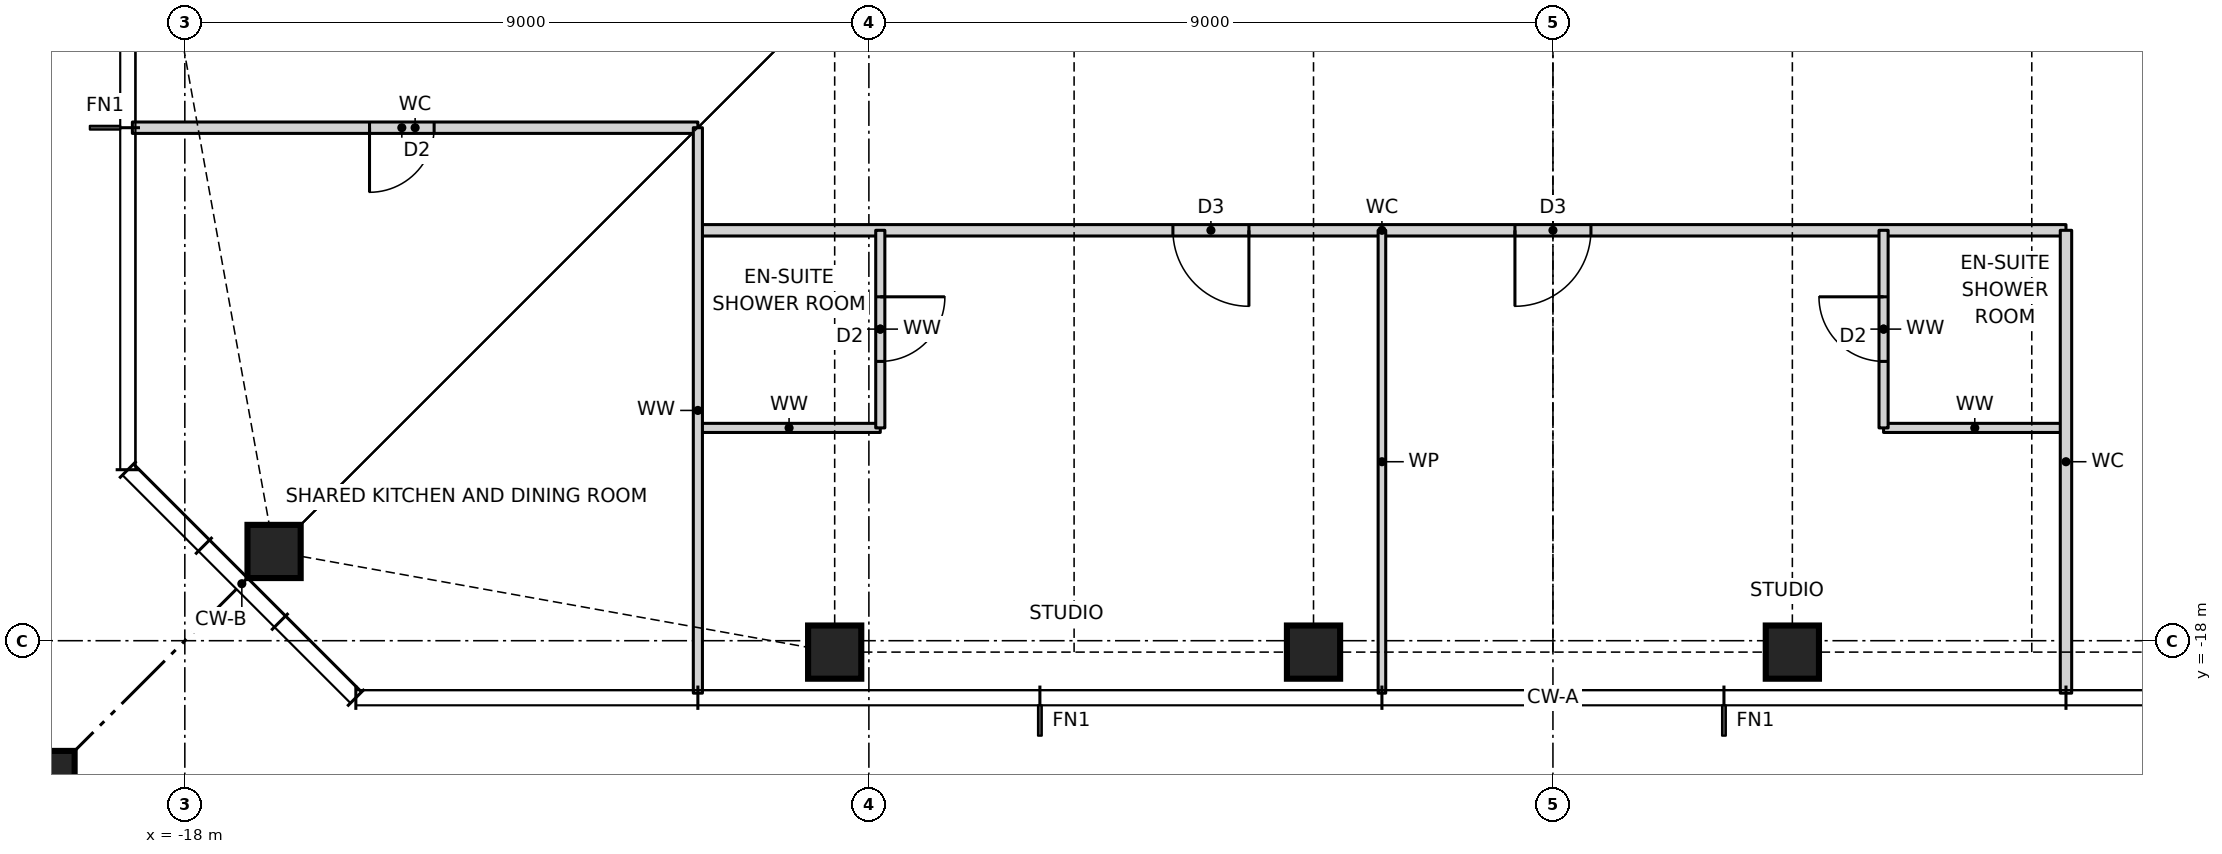
"""IFC4 building model, lengths in metres.
Left out: names, types, materials, properties, quantities, classifications, styles, units other than length and angle.
Written with IfcOpenShell. Run it as: python <this file> out.ifc"""

import sys

from ifc_helpers import new_model, si_unit, direction, frame, frame_2d, origin, origin_2d, place, context, subcontext, project, spatial, rectangle, hollow_rectangle, i_section, extrude, element, fill, save


model = new_model("IFC4")
c1 = context("Model", 3, precision=1e-05, world=origin(), true_north=direction((0.0, 1.0)))
c2 = subcontext(c1, "Body", "Model", "MODEL_VIEW")
j1 = project(units=[si_unit("LENGTHUNIT", "METRE"), si_unit("PLANEANGLEUNIT", "RADIAN")], contexts=[c1])
p1 = place(None, origin())
s1 = spatial("IfcSite", under=j1, at=p1, CompositionType="ELEMENT")
p2 = place(p1, origin())
s2 = spatial("IfcBuilding", under=s1, at=p2, CompositionType="ELEMENT")
p3 = place(p2, frame((0.0, 0.0, 195.0)))
s3 = spatial("IfcBuildingStorey", under=s2, at=p3, CompositionType="ELEMENT", Elevation=195.0)
for number, where, z_axis, x_axis in (
    (1, (-16.826, -16.826, 0.0), (0.0, 0.0, 1.0), (1.0, 0.0, 0.0)),
    (2, (-9.45, -18.15, 0.0), (0.0, 0.0, 1.0), (1.0, 0.0, 0.0)),
    (3, (-3.15, -18.15, 0.0), (0.0, 0.0, 1.0), (1.0, 0.0, 0.0)),
    (4, (3.15, -18.15, 0.0), (0.0, 0.0, 1.0), (1.0, 0.0, 0.0)),
):
    element("IfcColumn", number, at=place(p3, frame(where, z_axis=z_axis, x_axis=x_axis)), inside=s3, PredefinedType="COLUMN", context=c2, shape_type="SweptSolid", body=[
        extrude(hollow_rectangle(XDim=0.7, YDim=0.7, WallThickness=0.06, at=origin_2d()), origin(), (0.0, 0.0, 1.0), 3.5),
    ])
p4 = place(p3, frame((-21.65, -21.65, 0.0), z_axis=(0.0, 0.0, 1.0), x_axis=(1.0, 0.0, 0.0)))
e5 = element("IfcColumn", 5, at=p4, inside=s3, PredefinedType="COLUMN", context=c2, shape_type="SweptSolid", body=[
    extrude(rectangle(XDim=4.4, YDim=4.4, at=origin_2d()), origin(), (0.0, 0.0, 1.0), 3.5),
    extrude(i_section(OverallWidth=0.478, OverallDepth=0.599, WebThickness=0.1, FlangeThickness=0.14, at=origin_2d()), origin(), (0.0, 0.0, 1.0), 3.5),
])
for number, where, z_axis, x_axis in (
    (6, (-11.25, -15.2, 0.0), (0.0, 0.0, 1.0), (1.0, 0.0, 0.0)),
    (7, (4.35, -15.2, 0.0), (0.0, 0.0, 1.0), (1.0, 0.0, 0.0)),
):
    element("IfcWall", number, at=place(p3, frame(where, z_axis=z_axis, x_axis=x_axis)), inside=s3, PredefinedType="PARTITIONING", context=c2, shape_type="SweptSolid", body=[
        extrude(rectangle(XDim=2.4, YDim=0.12, at=frame_2d((1.2, 0.0))), origin(), (0.0, 0.0, 1.0), 3.27),
    ])
p5 = place(p3, frame((-11.25, -12.6, 0.0), z_axis=(0.0, 0.0, 1.0), x_axis=(1.0, 0.0, 0.0)))
e8 = element("IfcWall", 8, at=p5, inside=s3, PredefinedType="PARTITIONING", context=c2, shape_type="SweptSolid", body=[
    extrude(rectangle(XDim=18.0, YDim=0.15, at=frame_2d((9.0, 0.0))), origin(), (0.0, 0.0, 1.0), 3.27),
])
p6 = place(p5, frame((6.25, 0.0, 0.0)))
e9 = element("IfcOpeningElement", 9, at=p6, cuts=e8, PredefinedType="OPENING", context=c2, shape_type="SweptSolid", body=[
    extrude(rectangle(XDim=1.0, YDim=2.1, at=frame_2d((0.5, 1.05))), frame((0.0, 0.085, 0.0), z_axis=(0.0, -1.0, 0.0), x_axis=(1.0, 0.0, 0.0)), (0.0, 0.0, 1.0), 0.17),
])
p7 = place(p5, frame((10.75, 0.0, 0.0)))
e10 = element("IfcOpeningElement", 10, at=p7, cuts=e8, PredefinedType="OPENING", context=c2, shape_type="SweptSolid", body=[
    extrude(rectangle(XDim=1.0, YDim=2.1, at=frame_2d((0.5, 1.05))), frame((0.0, 0.085, 0.0), z_axis=(0.0, -1.0, 0.0), x_axis=(1.0, 0.0, 0.0)), (0.0, 0.0, 1.0), 0.17),
])
p8 = place(p3, frame((-18.69, -11.25, 0.0), z_axis=(0.0, 0.0, 1.0), x_axis=(1.0, 0.0, 0.0)))
e11 = element("IfcWall", 11, at=p8, inside=s3, PredefinedType="PARTITIONING", context=c2, shape_type="SweptSolid", body=[
    extrude(rectangle(XDim=7.44, YDim=0.15, at=frame_2d((3.72, 0.0))), origin(), (0.0, 0.0, 1.0), 3.27),
])
p9 = place(p8, frame((3.12, 0.0, 0.0)))
e12 = element("IfcOpeningElement", 12, at=p9, cuts=e11, PredefinedType="OPENING", context=c2, shape_type="SweptSolid", body=[
    extrude(rectangle(XDim=0.85, YDim=2.1, at=frame_2d((0.425, 1.05))), frame((0.0, 0.085, 0.0), z_axis=(0.0, -1.0, 0.0), x_axis=(1.0, 0.0, 0.0)), (0.0, 0.0, 1.0), 0.17),
])
p10 = place(p3, frame((6.75, -18.69, 0.0), z_axis=(0.0, 0.0, 1.0), x_axis=(0.0, 1.0, 0.0)))
e13 = element("IfcWall", 13, at=p10, inside=s3, PredefinedType="PARTITIONING", context=c2, shape_type="SweptSolid", body=[
    extrude(rectangle(XDim=6.09, YDim=0.15, at=frame_2d((3.045, 0.0))), origin(), (0.0, 0.0, 1.0), 3.27),
])
p11 = place(p3, frame((4.35, -15.2, 0.0), z_axis=(0.0, 0.0, 1.0), x_axis=(0.0, 1.0, 0.0)))
e14 = element("IfcWall", 14, at=p11, inside=s3, PredefinedType="PARTITIONING", context=c2, shape_type="SweptSolid", body=[
    extrude(rectangle(XDim=2.6, YDim=0.12, at=frame_2d((1.3, 0.0))), origin(), (0.0, 0.0, 1.0), 3.27),
])
p12 = place(p11, frame((0.875, 0.0, 0.0)))
e15 = element("IfcOpeningElement", 15, at=p12, cuts=e14, PredefinedType="OPENING", context=c2, shape_type="SweptSolid", body=[
    extrude(rectangle(XDim=0.85, YDim=2.1, at=frame_2d((0.425, 1.05))), frame((0.0, 0.07, 0.0), z_axis=(0.0, -1.0, 0.0), x_axis=(1.0, 0.0, 0.0)), (0.0, 0.0, 1.0), 0.14),
])
p13 = place(p3, frame((-2.25, -18.69, 0.0), z_axis=(0.0, 0.0, 1.0), x_axis=(0.0, 1.0, 0.0)))
e16 = element("IfcWall", 16, at=p13, inside=s3, PredefinedType="PARTITIONING", context=c2, shape_type="SweptSolid", body=[
    extrude(rectangle(XDim=6.09, YDim=0.1, at=frame_2d((3.045, 0.0))), origin(), (0.0, 0.0, 1.0), 3.27),
])
p14 = place(p3, frame((-8.85, -15.2, 0.0), z_axis=(0.0, 0.0, 1.0), x_axis=(0.0, 1.0, 0.0)))
e17 = element("IfcWall", 17, at=p14, inside=s3, PredefinedType="PARTITIONING", context=c2, shape_type="SweptSolid", body=[
    extrude(rectangle(XDim=2.6, YDim=0.12, at=frame_2d((1.3, 0.0))), origin(), (0.0, 0.0, 1.0), 3.27),
])
p15 = place(p14, frame((0.875, 0.0, 0.0)))
e18 = element("IfcOpeningElement", 18, at=p15, cuts=e17, PredefinedType="OPENING", context=c2, shape_type="SweptSolid", body=[
    extrude(rectangle(XDim=0.85, YDim=2.1, at=frame_2d((0.425, 1.05))), frame((0.0, 0.07, 0.0), z_axis=(0.0, -1.0, 0.0), x_axis=(1.0, 0.0, 0.0)), (0.0, 0.0, 1.0), 0.14),
])
p16 = place(p3, frame((-11.25, -18.69, 0.0), z_axis=(0.0, 0.0, 1.0), x_axis=(0.0, 1.0, 0.0)))
e19 = element("IfcWall", 19, at=p16, inside=s3, PredefinedType="PARTITIONING", context=c2, shape_type="SweptSolid", body=[
    extrude(rectangle(XDim=7.44, YDim=0.12, at=frame_2d((3.72, 0.0))), origin(), (0.0, 0.0, 1.0), 3.27),
])
p17 = place(p6, frame((1.0, 0.0, 0.0), z_axis=(0.0, 0.0, 1.0), x_axis=(-1.0, 0.0, 0.0)))
e20 = element("IfcDoor", 20, at=p17, inside=s3, OperationType="SINGLE_SWING_LEFT", PredefinedType="DOOR", context=c2, shape_type="SweptSolid", body=[
    extrude(rectangle(XDim=1.0, YDim=2.1, at=frame_2d((0.5, 1.05))), frame((0.0, 0.025, 0.0), z_axis=(0.0, -1.0, 0.0), x_axis=(1.0, 0.0, 0.0)), (0.0, 0.0, 1.0), 0.05),
])
fill(e9, e20)
p18 = place(p15, frame((0.85, 0.0, 0.0), z_axis=(0.0, 0.0, 1.0), x_axis=(-1.0, 0.0, 0.0)))
e21 = element("IfcDoor", 21, at=p18, inside=s3, OperationType="SINGLE_SWING_LEFT", PredefinedType="DOOR", context=c2, shape_type="SweptSolid", body=[
    extrude(rectangle(XDim=0.85, YDim=2.1, at=frame_2d((0.425, 1.05))), frame((0.0, 0.025, 0.0), z_axis=(0.0, -1.0, 0.0), x_axis=(1.0, 0.0, 0.0)), (0.0, 0.0, 1.0), 0.05),
])
fill(e18, e21)
p19 = place(p7, frame((1.0, 0.0, 0.0), z_axis=(0.0, 0.0, 1.0), x_axis=(-1.0, 0.0, 0.0)))
e22 = element("IfcDoor", 22, at=p19, inside=s3, OperationType="SINGLE_SWING_RIGHT", PredefinedType="DOOR", context=c2, shape_type="SweptSolid", body=[
    extrude(rectangle(XDim=1.0, YDim=2.1, at=frame_2d((0.5, 1.05))), frame((0.0, 0.025, 0.0), z_axis=(0.0, -1.0, 0.0), x_axis=(1.0, 0.0, 0.0)), (0.0, 0.0, 1.0), 0.05),
])
fill(e10, e22)
p20 = place(p12, origin())
e23 = element("IfcDoor", 23, at=p20, inside=s3, OperationType="SINGLE_SWING_RIGHT", PredefinedType="DOOR", context=c2, shape_type="SweptSolid", body=[
    extrude(rectangle(XDim=0.85, YDim=2.1, at=frame_2d((0.425, 1.05))), frame((0.0, 0.025, 0.0), z_axis=(0.0, -1.0, 0.0), x_axis=(1.0, 0.0, 0.0)), (0.0, 0.0, 1.0), 0.05),
])
fill(e15, e23)
p21 = place(p9, frame((0.85, 0.0, 0.0), z_axis=(0.0, 0.0, 1.0), x_axis=(-1.0, 0.0, 0.0)))
e24 = element("IfcDoor", 24, at=p21, inside=s3, OperationType="SINGLE_SWING_RIGHT", PredefinedType="DOOR", context=c2, shape_type="SweptSolid", body=[
    extrude(rectangle(XDim=0.85, YDim=2.1, at=frame_2d((0.425, 1.05))), frame((0.0, 0.025, 0.0), z_axis=(0.0, -1.0, 0.0), x_axis=(1.0, 0.0, 0.0)), (0.0, 0.0, 1.0), 0.05),
])
fill(e12, e24)
save(model, sys.argv[1])
